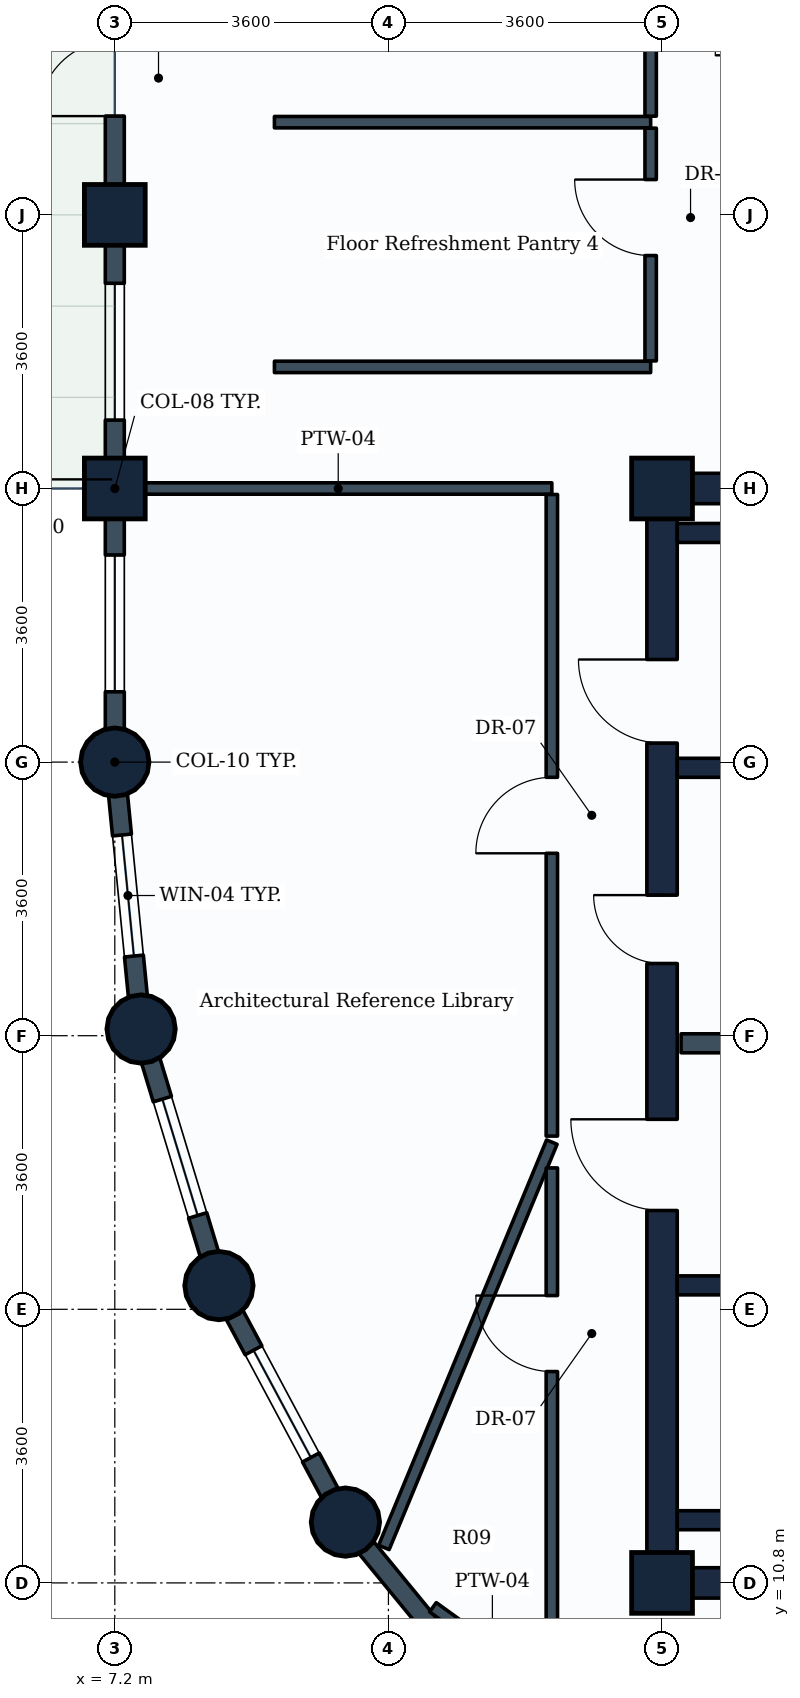
"""IFC4 building model, lengths in metres.
Left out: names, types, materials, properties, quantities, classifications, styles, units other than length and angle.
Written with IfcOpenShell. Run it as: python <this file> out.ifc"""

import sys

from ifc_helpers import new_model, si_unit, direction, frame, frame_2d, origin, origin_2d, place, context, subcontext, project, spatial, rectangle, circle, extrude, element, fill, save


model = new_model("IFC4")
c1 = context("Model", 3, precision=1e-05, world=origin(), true_north=direction((0.0, 1.0)))
c2 = subcontext(c1, "Body", "Model", "MODEL_VIEW")
j1 = project(units=[si_unit("LENGTHUNIT", "METRE"), si_unit("PLANEANGLEUNIT", "RADIAN")], contexts=[c1])
p1 = place(None, origin())
s1 = spatial("IfcSite", under=j1, at=p1, CompositionType="ELEMENT")
p2 = place(p1, origin())
s2 = spatial("IfcBuilding", under=s1, at=p2, CompositionType="ELEMENT")
p3 = place(p2, frame((0.0, 0.0, 266.6)))
s3 = spatial("IfcBuildingStorey", under=s2, at=p3, CompositionType="ELEMENT", Elevation=266.6)
p4 = place(p3, frame((7.2, 21.6, 0.0), z_axis=(0.0, 0.0, 1.0), x_axis=(1.0, 0.0, 0.0)))
e1 = element("IfcColumn", 1, at=p4, inside=s3, PredefinedType="COLUMN", context=c2, shape_type="SweptSolid", body=[
    extrude(circle(Radius=0.45, at=origin_2d()), origin(), (0.0, 0.0, 1.0), 3.6),
])
for number, where, z_axis, x_axis in (
    (2, (7.2, 25.2, 0.0), (0.0, 0.0, 1.0), (0.0, 1.0, 0.0)),
    (3, (7.2, 28.8, 0.0), (0.0, 0.0, 1.0), (0.0, 1.0, 0.0)),
):
    element("IfcColumn", number, at=place(p3, frame(where, z_axis=z_axis, x_axis=x_axis)), inside=s3, PredefinedType="COLUMN", context=c2, shape_type="SweptSolid", body=[
        extrude(rectangle(XDim=0.8, YDim=0.8, at=origin_2d()), origin(), (0.0, 0.0, 1.0), 3.6),
    ])
for number, where, z_axis, x_axis in (
    (4, (7.546, 18.088, 0.0), (0.0, 0.0, 1.0), (1.0, 0.0, 0.0)),
    (5, (8.57, 14.712, 0.0), (0.0, 0.0, 1.0), (1.0, 0.0, 0.0)),
    (6, (10.234, 11.6, 0.0), (0.0, 0.0, 1.0), (1.0, 0.0, 0.0)),
):
    element("IfcColumn", number, at=place(p3, frame(where, z_axis=z_axis, x_axis=x_axis)), inside=s3, PredefinedType="COLUMN", context=c2, shape_type="SweptSolid", body=[
        extrude(circle(Radius=0.45, at=origin_2d()), origin(), (0.0, 0.0, 1.0), 3.6),
    ])
for number, where, z_axis, x_axis in (
    (7, (14.4, 10.8, 0.0), (0.0, 0.0, 1.0), (1.0, 0.0, 0.0)),
    (8, (14.4, 25.2, 0.0), (0.0, 0.0, 1.0), (1.0, 0.0, 0.0)),
):
    element("IfcColumn", number, at=place(p3, frame(where, z_axis=z_axis, x_axis=x_axis)), inside=s3, PredefinedType="COLUMN", context=c2, shape_type="SweptSolid", body=[
        extrude(rectangle(XDim=0.8, YDim=0.8, at=origin_2d()), origin(), (0.0, 0.0, 1.0), 3.6),
    ])
p5 = place(p3, frame((7.2, 28.8, 0.0), z_axis=(0.0, 0.0, 1.0), x_axis=(0.0, 1.0, 0.0)))
e9 = element("IfcWall", 9, at=p5, inside=s3, PredefinedType="STANDARD", context=c2, shape_type="SweptSolid", body=[
    extrude(rectangle(XDim=3.6, YDim=0.25, at=frame_2d((1.8, 0.0))), origin(), (0.0, 0.0, 1.0), 2.83),
])
p6 = place(p5, frame((1.3, 0.0, 0.0)))
e10 = element("IfcOpeningElement", 10, at=p6, cuts=e9, PredefinedType="OPENING", context=c2, shape_type="SweptSolid", body=[
    extrude(rectangle(XDim=1.0, YDim=2.1, at=frame_2d((0.5, 1.05))), frame((0.0, 0.135, 0.0), z_axis=(0.0, -1.0, 0.0), x_axis=(1.0, 0.0, 0.0)), (0.0, 0.0, 1.0), 0.27),
])
p7 = place(p3, frame((7.2, 25.2, 0.0), z_axis=(0.0, 0.0, 1.0), x_axis=(0.0, 1.0, 0.0)))
e11 = element("IfcWall", 11, at=p7, inside=s3, PredefinedType="STANDARD", context=c2, shape_type="SweptSolid", body=[
    extrude(rectangle(XDim=3.6, YDim=0.25, at=frame_2d((1.8, 0.0))), origin(), (0.0, 0.0, 1.0), 2.83),
])
p8 = place(p7, frame((0.9, 0.0, 0.85)))
e12 = element("IfcOpeningElement", 12, at=p8, cuts=e11, PredefinedType="OPENING", context=c2, shape_type="SweptSolid", body=[
    extrude(rectangle(XDim=1.8, YDim=1.35, at=frame_2d((0.9, 0.675))), frame((0.0, 0.135, 0.0), z_axis=(0.0, -1.0, 0.0), x_axis=(1.0, 0.0, 0.0)), (0.0, 0.0, 1.0), 0.27),
])
p9 = place(p3, frame((7.2, 21.6, 0.0), z_axis=(0.0, 0.0, 1.0), x_axis=(0.0, 1.0, 0.0)))
e13 = element("IfcWall", 13, at=p9, inside=s3, PredefinedType="STANDARD", context=c2, shape_type="SweptSolid", body=[
    extrude(rectangle(XDim=3.6, YDim=0.25, at=frame_2d((1.8, 0.0))), origin(), (0.0, 0.0, 1.0), 2.83),
])
p10 = place(p9, frame((0.925, 0.0, 0.85)))
e14 = element("IfcOpeningElement", 14, at=p10, cuts=e13, PredefinedType="OPENING", context=c2, shape_type="SweptSolid", body=[
    extrude(rectangle(XDim=1.8, YDim=1.35, at=frame_2d((0.9, 0.675))), frame((0.0, 0.135, 0.0), z_axis=(0.0, -1.0, 0.0), x_axis=(1.0, 0.0, 0.0)), (0.0, 0.0, 1.0), 0.27),
])
p11 = place(p3, frame((7.546, 18.088, 0.0), z_axis=(0.0, 0.0, 1.0), x_axis=(-0.09802417461, 0.995184033831, 0.0)))
e15 = element("IfcWall", 15, at=p11, inside=s3, PredefinedType="STANDARD", context=c2, shape_type="SweptSolid", body=[
    extrude(rectangle(XDim=3.529, YDim=0.25, at=frame_2d((1.765, 0.0))), origin(), (0.0, 0.0, 1.0), 2.83),
])
p12 = place(p11, frame((0.965, 0.0, 0.85)))
e16 = element("IfcOpeningElement", 16, at=p12, cuts=e15, PredefinedType="OPENING", context=c2, shape_type="SweptSolid", body=[
    extrude(rectangle(XDim=1.6, YDim=1.35, at=frame_2d((0.8, 0.675))), frame((0.0, 0.135, 0.0), z_axis=(0.0, -1.0, 0.0), x_axis=(1.0, 0.0, 0.0)), (0.0, 0.0, 1.0), 0.27),
])
p13 = place(p3, frame((8.57, 14.712, 0.0), z_axis=(0.0, 0.0, 1.0), x_axis=(-0.290305086481, 0.956934144423, 0.0)))
e17 = element("IfcWall", 17, at=p13, inside=s3, PredefinedType="STANDARD", context=c2, shape_type="SweptSolid", body=[
    extrude(rectangle(XDim=3.528, YDim=0.25, at=frame_2d((1.764, 0.0))), origin(), (0.0, 0.0, 1.0), 2.83),
])
p14 = place(p13, frame((0.964, 0.0, 0.85)))
e18 = element("IfcOpeningElement", 18, at=p14, cuts=e17, PredefinedType="OPENING", context=c2, shape_type="SweptSolid", body=[
    extrude(rectangle(XDim=1.6, YDim=1.35, at=frame_2d((0.8, 0.675))), frame((0.0, 0.135, 0.0), z_axis=(0.0, -1.0, 0.0), x_axis=(1.0, 0.0, 0.0)), (0.0, 0.0, 1.0), 0.27),
])
p15 = place(p3, frame((10.234, 11.6, 0.0), z_axis=(0.0, 0.0, 1.0), x_axis=(-0.47151087309, 0.881860247748, 0.0)))
e19 = element("IfcWall", 19, at=p15, inside=s3, PredefinedType="STANDARD", context=c2, shape_type="SweptSolid", body=[
    extrude(rectangle(XDim=3.529, YDim=0.25, at=frame_2d((1.764, 0.0))), origin(), (0.0, 0.0, 1.0), 2.83),
])
p16 = place(p15, frame((0.964, 0.0, 0.85)))
e20 = element("IfcOpeningElement", 20, at=p16, cuts=e19, PredefinedType="OPENING", context=c2, shape_type="SweptSolid", body=[
    extrude(rectangle(XDim=1.6, YDim=1.35, at=frame_2d((0.8, 0.675))), frame((0.0, 0.135, 0.0), z_axis=(0.0, -1.0, 0.0), x_axis=(1.0, 0.0, 0.0)), (0.0, 0.0, 1.0), 0.27),
])
p17 = place(p3, frame((12.472, 8.872, 0.0), z_axis=(0.0, 0.0, 1.0), x_axis=(-0.634258295121, 0.773121216285, 0.0)))
e21 = element("IfcWall", 21, at=p17, inside=s3, PredefinedType="STANDARD", context=c2, shape_type="SweptSolid", body=[
    extrude(rectangle(XDim=3.529, YDim=0.25, at=frame_2d((1.764, 0.0))), origin(), (0.0, 0.0, 1.0), 2.83),
])
p18 = place(p3, frame((14.4, 10.8, 0.0), z_axis=(0.0, 0.0, 1.0), x_axis=(1.0, 0.0, 0.0)))
e22 = element("IfcWall", 22, at=p18, inside=s3, PredefinedType="SHEAR", context=c2, shape_type="SweptSolid", body=[
    extrude(rectangle(XDim=18.0, YDim=0.4, at=frame_2d((9.0, 0.0))), origin(), (0.0, 0.0, 1.0), 3.35),
])
p19 = place(p3, frame((14.4, 25.2, 0.0), z_axis=(0.0, 0.0, 1.0), x_axis=(1.0, 0.0, 0.0)))
e23 = element("IfcWall", 23, at=p19, inside=s3, PredefinedType="SHEAR", context=c2, shape_type="SweptSolid", body=[
    extrude(rectangle(XDim=10.8, YDim=0.4, at=frame_2d((5.4, 0.0))), origin(), (0.0, 0.0, 1.0), 3.35),
])
p20 = place(p3, frame((14.4, 10.8, 0.0), z_axis=(0.0, 0.0, 1.0), x_axis=(0.0, 1.0, 0.0)))
e24 = element("IfcWall", 24, at=p20, inside=s3, PredefinedType="SHEAR", context=c2, shape_type="SweptSolid", body=[
    extrude(rectangle(XDim=14.4, YDim=0.4, at=frame_2d((7.2, 0.0))), origin(), (0.0, 0.0, 1.0), 3.35),
])
p21 = place(p20, frame((11.05, 0.0, 0.0)))
e25 = element("IfcOpeningElement", 25, at=p21, cuts=e24, PredefinedType="OPENING", context=c2, shape_type="SweptSolid", body=[
    extrude(rectangle(XDim=1.1, YDim=2.1, at=frame_2d((0.55, 1.05))), frame((0.0, 0.21, 0.0), z_axis=(0.0, -1.0, 0.0), x_axis=(1.0, 0.0, 0.0)), (0.0, 0.0, 1.0), 0.42),
])
p22 = place(p20, frame((4.9, 0.0, 0.0)))
e26 = element("IfcOpeningElement", 26, at=p22, cuts=e24, PredefinedType="OPENING", context=c2, shape_type="SweptSolid", body=[
    extrude(rectangle(XDim=1.2, YDim=2.1, at=frame_2d((0.6, 1.05))), frame((0.0, 0.21, 0.0), z_axis=(0.0, -1.0, 0.0), x_axis=(1.0, 0.0, 0.0)), (0.0, 0.0, 1.0), 0.42),
])
p23 = place(p20, frame((8.15, 0.0, 0.0)))
e27 = element("IfcOpeningElement", 27, at=p23, cuts=e24, PredefinedType="OPENING", context=c2, shape_type="SweptSolid", body=[
    extrude(rectangle(XDim=0.9, YDim=2.1, at=frame_2d((0.45, 1.05))), frame((0.0, 0.21, 0.0), z_axis=(0.0, -1.0, 0.0), x_axis=(1.0, 0.0, 0.0)), (0.0, 0.0, 1.0), 0.42),
])
p24 = place(p3, frame((14.6, 11.625, 0.0), z_axis=(0.0, 0.0, 1.0), x_axis=(1.0, 0.0, 0.0)))
e28 = element("IfcWall", 28, at=p24, inside=s3, PredefinedType="SHEAR", context=c2, shape_type="SweptSolid", body=[
    extrude(rectangle(XDim=8.75, YDim=0.25, at=frame_2d((4.375, 0.0))), origin(), (0.0, 0.0, 1.0), 3.35),
])
p25 = place(p3, frame((14.6, 14.715, 0.0), z_axis=(0.0, 0.0, 1.0), x_axis=(1.0, 0.0, 0.0)))
e29 = element("IfcWall", 29, at=p25, inside=s3, PredefinedType="SHEAR", context=c2, shape_type="SweptSolid", body=[
    extrude(rectangle(XDim=8.75, YDim=0.25, at=frame_2d((4.375, 0.0))), origin(), (0.0, 0.0, 1.0), 3.35),
])
p26 = place(p25, frame((0.755, 0.0, 0.0)))
e30 = element("IfcOpeningElement", 30, at=p26, cuts=e29, PredefinedType="OPENING", context=c2, shape_type="SweptSolid", body=[
    extrude(rectangle(XDim=1.1, YDim=2.1, at=frame_2d((0.55, 1.05))), frame((0.0, 0.135, 0.0), z_axis=(0.0, -1.0, 0.0), x_axis=(1.0, 0.0, 0.0)), (0.0, 0.0, 1.0), 0.27),
])
for number, where, z_axis, x_axis in (
    (31, (14.6, 21.525, 0.0), (0.0, 0.0, 1.0), (1.0, 0.0, 0.0)),
    (32, (14.6, 24.615, 0.0), (0.0, 0.0, 1.0), (1.0, 0.0, 0.0)),
):
    element("IfcWall", number, at=place(p3, frame(where, z_axis=z_axis, x_axis=x_axis)), inside=s3, PredefinedType="SHEAR", context=c2, shape_type="SweptSolid", body=[
        extrude(rectangle(XDim=8.3, YDim=0.25, at=frame_2d((4.15, 0.0))), origin(), (0.0, 0.0, 1.0), 3.35),
    ])
p27 = place(p3, frame((14.65, 17.9, 0.0), z_axis=(0.0, 0.0, 1.0), x_axis=(1.0, 0.0, 0.0)))
e33 = element("IfcWall", 33, at=p27, inside=s3, PredefinedType="PARTITIONING", context=c2, shape_type="SweptSolid", body=[
    extrude(rectangle(XDim=7.15, YDim=0.25, at=frame_2d((3.575, 0.0))), origin(), (0.0, 0.0, 1.0), 3.335),
])
p28 = place(p3, frame((7.329, 25.2, 0.0), z_axis=(0.0, 0.0, 1.0), x_axis=(1.0, 0.0, 0.0)))
e34 = element("IfcWall", 34, at=p28, inside=s3, PredefinedType="PARTITIONING", context=c2, shape_type="SweptSolid", body=[
    extrude(rectangle(XDim=5.621, YDim=0.15, at=frame_2d((2.811, 0.0))), origin(), (0.0, 0.0, 1.0), 3.335),
])
p29 = place(p3, frame((12.95, 9.35, 0.0), z_axis=(0.0, 0.0, 1.0), x_axis=(-0.8106792284, 0.585490553844, 0.0)))
e35 = element("IfcWall", 35, at=p29, inside=s3, PredefinedType="PARTITIONING", context=c2, shape_type="SweptSolid", body=[
    extrude(rectangle(XDim=1.93, YDim=0.15, at=frame_2d((0.965, 0.0))), origin(), (0.0, 0.0, 1.0), 2.83),
])
p30 = place(p3, frame((12.95, 16.6, 0.0), z_axis=(0.0, 0.0, 1.0), x_axis=(-0.382758890427, -0.923848273148, 0.0)))
e36 = element("IfcWall", 36, at=p30, inside=s3, PredefinedType="PARTITIONING", context=c2, shape_type="SweptSolid", body=[
    extrude(rectangle(XDim=5.773, YDim=0.15, at=frame_2d((2.887, 0.0))), origin(), (0.0, 0.0, 1.0), 2.83),
])
p31 = place(p3, frame((12.95, 16.679, 0.0), z_axis=(0.0, 0.0, 1.0), x_axis=(0.0, 1.0, 0.0)))
e37 = element("IfcWall", 37, at=p31, inside=s3, PredefinedType="PARTITIONING", context=c2, shape_type="SweptSolid", body=[
    extrude(rectangle(XDim=8.442, YDim=0.15, at=frame_2d((4.221, 0.0))), origin(), (0.0, 0.0, 1.0), 3.02),
])
p32 = place(p31, frame((3.721, 0.0, 0.0)))
e38 = element("IfcOpeningElement", 38, at=p32, cuts=e37, PredefinedType="OPENING", context=c2, shape_type="SweptSolid", body=[
    extrude(rectangle(XDim=1.0, YDim=2.1, at=frame_2d((0.5, 1.05))), frame((0.0, 0.085, 0.0), z_axis=(0.0, -1.0, 0.0), x_axis=(1.0, 0.0, 0.0)), (0.0, 0.0, 1.0), 0.17),
])
p33 = place(p3, frame((12.95, 8.609, 0.0), z_axis=(0.0, 0.0, 1.0), x_axis=(0.0, 1.0, 0.0)))
e39 = element("IfcWall", 39, at=p33, inside=s3, PredefinedType="PARTITIONING", context=c2, shape_type="SweptSolid", body=[
    extrude(rectangle(XDim=7.652, YDim=0.15, at=frame_2d((3.826, 0.0))), origin(), (0.0, 0.0, 1.0), 2.83),
])
p34 = place(p33, frame((4.972, 0.0, 0.0)))
e40 = element("IfcOpeningElement", 40, at=p34, cuts=e39, PredefinedType="OPENING", context=c2, shape_type="SweptSolid", body=[
    extrude(rectangle(XDim=1.0, YDim=2.1, at=frame_2d((0.5, 1.05))), frame((0.0, 0.085, 0.0), z_axis=(0.0, -1.0, 0.0), x_axis=(1.0, 0.0, 0.0)), (0.0, 0.0, 1.0), 0.17),
])
for number, where, z_axis, x_axis in (
    (41, (9.3, 26.8, 0.0), (0.0, 0.0, 1.0), (1.0, 0.0, 0.0)),
    (42, (9.3, 30.02, 0.0), (0.0, 0.0, 1.0), (1.0, 0.0, 0.0)),
):
    element("IfcWall", number, at=place(p3, frame(where, z_axis=z_axis, x_axis=x_axis)), inside=s3, PredefinedType="PARTITIONING", context=c2, shape_type="SweptSolid", body=[
        extrude(rectangle(XDim=4.95, YDim=0.15, at=frame_2d((2.475, 0.0))), origin(), (0.0, 0.0, 1.0), 3.335),
    ])
p35 = place(p3, frame((14.25, 26.879, 0.0), z_axis=(0.0, 0.0, 1.0), x_axis=(0.0, 1.0, 0.0)))
e43 = element("IfcWall", 43, at=p35, inside=s3, PredefinedType="PARTITIONING", context=c2, shape_type="SweptSolid", body=[
    extrude(rectangle(XDim=3.062, YDim=0.15, at=frame_2d((1.531, 0.0))), origin(), (0.0, 0.0, 1.0), 3.03),
])
p36 = place(p35, frame((1.386, 0.0, 0.0)))
e44 = element("IfcOpeningElement", 44, at=p36, cuts=e43, PredefinedType="OPENING", context=c2, shape_type="SweptSolid", body=[
    extrude(rectangle(XDim=1.0, YDim=2.1, at=frame_2d((0.5, 1.05))), frame((0.0, 0.085, 0.0), z_axis=(0.0, -1.0, 0.0), x_axis=(1.0, 0.0, 0.0)), (0.0, 0.0, 1.0), 0.17),
])
p37 = place(p3, frame((14.25, 30.099, 0.0), z_axis=(0.0, 0.0, 1.0), x_axis=(0.0, 1.0, 0.0)))
e45 = element("IfcWall", 45, at=p37, inside=s3, PredefinedType="PARTITIONING", context=c2, shape_type="SweptSolid", body=[
    extrude(rectangle(XDim=5.772, YDim=0.15, at=frame_2d((2.886, 0.0))), origin(), (0.0, 0.0, 1.0), 2.83),
])
p38 = place(p37, frame((1.701, 0.0, 0.0)))
e46 = element("IfcOpeningElement", 46, at=p38, cuts=e45, PredefinedType="OPENING", context=c2, shape_type="SweptSolid", body=[
    extrude(rectangle(XDim=1.0, YDim=2.1, at=frame_2d((0.5, 1.05))), frame((0.0, 0.085, 0.0), z_axis=(0.0, -1.0, 0.0), x_axis=(1.0, 0.0, 0.0)), (0.0, 0.0, 1.0), 0.17),
])
p39 = place(p6, origin())
e47 = element("IfcDoor", 47, at=p39, inside=s3, OperationType="SINGLE_SWING_LEFT", PredefinedType="DOOR", context=c2, shape_type="SweptSolid", body=[
    extrude(rectangle(XDim=1.0, YDim=2.1, at=frame_2d((0.5, 1.05))), frame((0.0, 0.025, 0.0), z_axis=(0.0, -1.0, 0.0), x_axis=(1.0, 0.0, 0.0)), (0.0, 0.0, 1.0), 0.05),
])
fill(e10, e47)
p40 = place(p8, origin())
e48 = element("IfcWindow", 48, at=p40, inside=s3, PartitioningType="SINGLE_PANEL", PredefinedType="WINDOW", context=c2, shape_type="SweptSolid", body=[
    extrude(rectangle(XDim=1.8, YDim=1.35, at=frame_2d((0.9, 0.675))), frame((0.0, 0.03, 0.0), z_axis=(0.0, -1.0, 0.0), x_axis=(1.0, 0.0, 0.0)), (0.0, 0.0, 1.0), 0.06),
])
fill(e12, e48)
p41 = place(p10, origin())
e49 = element("IfcWindow", 49, at=p41, inside=s3, PartitioningType="SINGLE_PANEL", PredefinedType="WINDOW", context=c2, shape_type="SweptSolid", body=[
    extrude(rectangle(XDim=1.8, YDim=1.35, at=frame_2d((0.9, 0.675))), frame((0.0, 0.03, 0.0), z_axis=(0.0, -1.0, 0.0), x_axis=(1.0, 0.0, 0.0)), (0.0, 0.0, 1.0), 0.06),
])
fill(e14, e49)
p42 = place(p12, origin())
e50 = element("IfcWindow", 50, at=p42, inside=s3, PartitioningType="SINGLE_PANEL", PredefinedType="WINDOW", context=c2, shape_type="SweptSolid", body=[
    extrude(rectangle(XDim=1.6, YDim=1.35, at=frame_2d((0.8, 0.675))), frame((0.0, 0.03, 0.0), z_axis=(0.0, -1.0, 0.0), x_axis=(1.0, 0.0, 0.0)), (0.0, 0.0, 1.0), 0.06),
])
fill(e16, e50)
p43 = place(p14, origin())
e51 = element("IfcWindow", 51, at=p43, inside=s3, PartitioningType="SINGLE_PANEL", PredefinedType="WINDOW", context=c2, shape_type="SweptSolid", body=[
    extrude(rectangle(XDim=1.6, YDim=1.35, at=frame_2d((0.8, 0.675))), frame((0.0, 0.03, 0.0), z_axis=(0.0, -1.0, 0.0), x_axis=(1.0, 0.0, 0.0)), (0.0, 0.0, 1.0), 0.06),
])
fill(e18, e51)
p44 = place(p16, origin())
e52 = element("IfcWindow", 52, at=p44, inside=s3, PartitioningType="SINGLE_PANEL", PredefinedType="WINDOW", context=c2, shape_type="SweptSolid", body=[
    extrude(rectangle(XDim=1.6, YDim=1.35, at=frame_2d((0.8, 0.675))), frame((0.0, 0.03, 0.0), z_axis=(0.0, -1.0, 0.0), x_axis=(1.0, 0.0, 0.0)), (0.0, 0.0, 1.0), 0.06),
])
fill(e20, e52)
p45 = place(p21, origin())
e53 = element("IfcDoor", 53, at=p45, inside=s3, OperationType="SINGLE_SWING_RIGHT", PredefinedType="DOOR", context=c2, shape_type="SweptSolid", body=[
    extrude(rectangle(XDim=1.1, YDim=2.1, at=frame_2d((0.55, 1.05))), frame((0.0, 0.025, 0.0), z_axis=(0.0, -1.0, 0.0), x_axis=(1.0, 0.0, 0.0)), (0.0, 0.0, 1.0), 0.05),
])
fill(e25, e53)
p46 = place(p22, origin())
e54 = element("IfcDoor", 54, at=p46, inside=s3, OperationType="SINGLE_SWING_RIGHT", PredefinedType="DOOR", context=c2, shape_type="SweptSolid", body=[
    extrude(rectangle(XDim=1.2, YDim=2.1, at=frame_2d((0.6, 1.05))), frame((0.0, 0.025, 0.0), z_axis=(0.0, -1.0, 0.0), x_axis=(1.0, 0.0, 0.0)), (0.0, 0.0, 1.0), 0.05),
])
fill(e26, e54)
p47 = place(p23, origin())
e55 = element("IfcDoor", 55, at=p47, inside=s3, OperationType="SINGLE_SWING_RIGHT", PredefinedType="DOOR", context=c2, shape_type="SweptSolid", body=[
    extrude(rectangle(XDim=0.9, YDim=2.1, at=frame_2d((0.45, 1.05))), frame((0.0, 0.025, 0.0), z_axis=(0.0, -1.0, 0.0), x_axis=(1.0, 0.0, 0.0)), (0.0, 0.0, 1.0), 0.05),
])
fill(e27, e55)
p48 = place(p32, origin())
e56 = element("IfcDoor", 56, at=p48, inside=s3, OperationType="SINGLE_SWING_LEFT", PredefinedType="DOOR", context=c2, shape_type="SweptSolid", body=[
    extrude(rectangle(XDim=1.0, YDim=2.1, at=frame_2d((0.5, 1.05))), frame((0.0, 0.025, 0.0), z_axis=(0.0, -1.0, 0.0), x_axis=(1.0, 0.0, 0.0)), (0.0, 0.0, 1.0), 0.05),
])
fill(e38, e56)
p49 = place(p34, origin())
e57 = element("IfcDoor", 57, at=p49, inside=s3, OperationType="SINGLE_SWING_RIGHT", PredefinedType="DOOR", context=c2, shape_type="SweptSolid", body=[
    extrude(rectangle(XDim=1.0, YDim=2.1, at=frame_2d((0.5, 1.05))), frame((0.0, 0.025, 0.0), z_axis=(0.0, -1.0, 0.0), x_axis=(1.0, 0.0, 0.0)), (0.0, 0.0, 1.0), 0.05),
])
fill(e40, e57)
p50 = place(p36, origin())
e58 = element("IfcDoor", 58, at=p50, inside=s3, OperationType="SINGLE_SWING_RIGHT", PredefinedType="DOOR", context=c2, shape_type="SweptSolid", body=[
    extrude(rectangle(XDim=1.0, YDim=2.1, at=frame_2d((0.5, 1.05))), frame((0.0, 0.025, 0.0), z_axis=(0.0, -1.0, 0.0), x_axis=(1.0, 0.0, 0.0)), (0.0, 0.0, 1.0), 0.05),
])
fill(e44, e58)
save(model, sys.argv[1])
